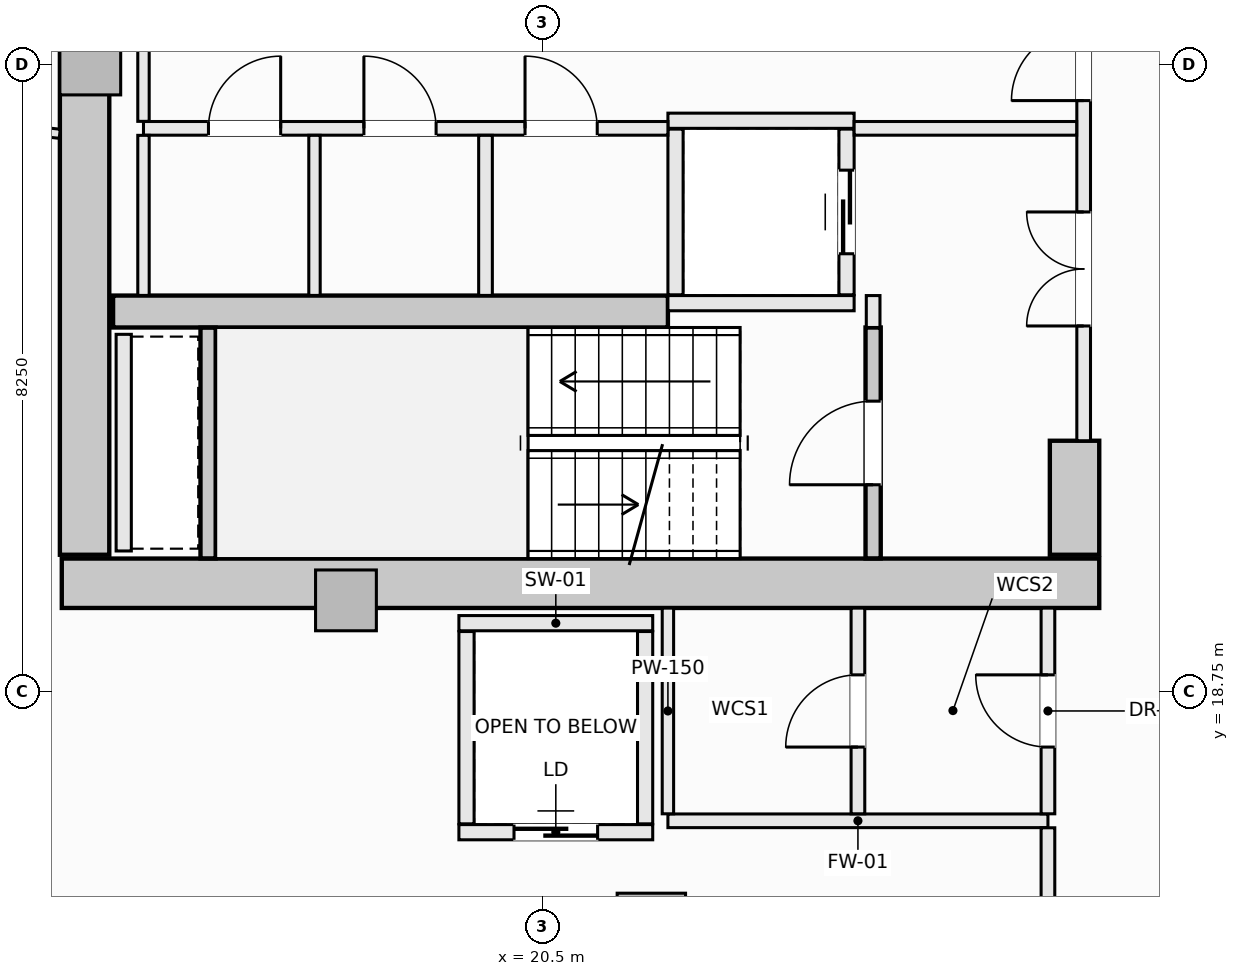
"""IFC4 building model, lengths in metres.
Left out: names, types, materials, properties, quantities, classifications, styles, units other than length and angle.
Written with IfcOpenShell. Run it as: python <this file> out.ifc"""

import sys

from ifc_helpers import new_model, si_unit, direction, frame, frame_2d, origin, origin_2d, place, context, subcontext, project, spatial, rectangle, extrude, element, fill, save


model = new_model("IFC4")
c1 = context("Model", 3, precision=1e-05, world=origin(), true_north=direction((0.0, 1.0)))
c2 = subcontext(c1, "Body", "Model", "MODEL_VIEW")
j1 = project(units=[si_unit("LENGTHUNIT", "METRE"), si_unit("PLANEANGLEUNIT", "RADIAN")], contexts=[c1])
p1 = place(None, origin())
s1 = spatial("IfcSite", under=j1, at=p1, CompositionType="ELEMENT")
p2 = place(p1, origin())
s2 = spatial("IfcBuilding", under=s1, at=p2, CompositionType="ELEMENT")
p3 = place(p2, frame((0.0, 0.0, 112.1)))
s3 = spatial("IfcBuildingStorey", under=s2, at=p3, CompositionType="ELEMENT", Elevation=112.1)
p4 = place(p3, frame((14.175, 20.175, -0.27), z_axis=(0.0, 0.0, 1.0), x_axis=(1.0, 0.0, 0.0)))
e1 = element("IfcWall", 1, at=p4, inside=s3, PredefinedType="SHEAR", context=c2, shape_type="SweptSolid", body=[
    extrude(rectangle(XDim=13.65, YDim=0.65, at=frame_2d((6.825, 0.0))), origin(), (0.0, 0.0, 1.0), 3.4),
])
p5 = place(p3, frame((14.475, 20.55, -0.27), z_axis=(0.0, 0.0, 1.0), x_axis=(0.0, 1.0, 0.0)))
e2 = element("IfcWall", 2, at=p5, inside=s3, PredefinedType="SHEAR", context=c2, shape_type="SweptSolid", body=[
    extrude(rectangle(XDim=12.9, YDim=0.65, at=frame_2d((6.45, 0.0))), origin(), (0.0, 0.0, 1.0), 3.4),
])
p6 = place(p3, frame((27.5, 20.55, -0.27), z_axis=(0.0, 0.0, 1.0), x_axis=(0.0, 1.0, 0.0)))
e3 = element("IfcWall", 3, at=p6, inside=s3, PredefinedType="SHEAR", context=c2, shape_type="SweptSolid", body=[
    extrude(rectangle(XDim=1.5, YDim=0.65, at=frame_2d((0.75, 0.0))), origin(), (0.0, 0.0, 1.0), 3.4),
])
p7 = place(p3, frame((14.85, 23.75, -0.27), z_axis=(0.0, 0.0, 1.0), x_axis=(1.0, 0.0, 0.0)))
e4 = element("IfcWall", 4, at=p7, inside=s3, PredefinedType="SHEAR", context=c2, shape_type="SweptSolid", body=[
    extrude(rectangle(XDim=7.3, YDim=0.42, at=frame_2d((3.65, 0.0))), origin(), (0.0, 0.0, 1.0), 3.4),
])
p8 = place(p3, frame((21.932, 15.648, -0.27), z_axis=(0.0, 0.0, 1.0), x_axis=(1.0, 0.0, 0.0)))
e5 = element("IfcColumn", 5, at=p8, inside=s3, PredefinedType="COLUMN", context=c2, shape_type="SweptSolid", body=[
    extrude(rectangle(XDim=0.9, YDim=0.9, at=origin_2d()), origin(), (0.0, 0.0, 1.0), 3.4),
])
for number, where, z_axis, x_axis in (
    (6, (14.55, 27.0, -0.27), (0.0, 0.0, 1.0), (1.0, 0.0, 0.0)),
    (7, (17.914, 19.95, -0.27), (0.0, 0.0, 1.0), (1.0, 0.0, 0.0)),
):
    element("IfcColumn", number, at=place(p3, frame(where, z_axis=z_axis, x_axis=x_axis)), inside=s3, PredefinedType="PILASTER", context=c2, shape_type="SweptSolid", body=[
        extrude(rectangle(XDim=0.8, YDim=0.8, at=origin_2d()), origin(), (0.0, 0.0, 1.0), 3.4),
    ])
p9 = place(p3, frame((9.178, 17.325, 0.0), z_axis=(0.0, 0.0, 1.0), x_axis=(0.901370184739, -0.433049408339, 0.0)))
e8 = element("IfcWall", 8, at=p9, inside=s3, PredefinedType="SOLIDWALL", context=c2, shape_type="SweptSolid", body=[
    extrude(rectangle(XDim=5.884, YDim=0.3, at=frame_2d((2.942, 0.0))), origin(), (0.0, 0.0, 1.0), 2.653),
])
p10 = place(p9, frame((1.892, 0.0, 0.74)))
e9 = element("IfcOpeningElement", 9, at=p10, cuts=e8, PredefinedType="OPENING", context=c2, shape_type="SweptSolid", body=[
    extrude(rectangle(XDim=2.1, YDim=1.7, at=frame_2d((1.05, 0.85))), frame((0.0, 0.16, 0.0), z_axis=(0.0, -1.0, 0.0), x_axis=(1.0, 0.0, 0.0)), (0.0, 0.0, 1.0), 0.32),
])
p11 = place(p3, frame((24.85, 20.502, -0.27), z_axis=(0.0, 0.0, 1.0), x_axis=(0.0, 1.0, 0.0)))
e10 = element("IfcWall", 10, at=p11, inside=s3, PredefinedType="SHEAR", context=c2, shape_type="SweptSolid", body=[
    extrude(rectangle(XDim=3.038, YDim=0.2, at=frame_2d((1.519, 0.0))), origin(), (0.0, 0.0, 1.0), 3.4),
])
p12 = place(p11, frame((0.969, 0.0, 0.27)))
e11 = element("IfcOpeningElement", 11, at=p12, cuts=e10, PredefinedType="OPENING", context=c2, shape_type="SweptSolid", body=[
    extrude(rectangle(XDim=1.1, YDim=2.15, at=frame_2d((0.55, 1.075))), frame((0.0, 0.11, 0.0), z_axis=(0.0, -1.0, 0.0), x_axis=(1.0, 0.0, 0.0)), (0.0, 0.0, 1.0), 0.22),
])
p13 = place(p3, frame((16.1, 20.502, -0.27), z_axis=(0.0, 0.0, 1.0), x_axis=(0.0, 1.0, 0.0)))
e12 = element("IfcWall", 12, at=p13, inside=s3, PredefinedType="SHEAR", context=c2, shape_type="SweptSolid", body=[
    extrude(rectangle(XDim=3.036, YDim=0.2, at=frame_2d((1.518, 0.0))), origin(), (0.0, 0.0, 1.0), 3.4),
])
for number, where, z_axis, x_axis in (
    (13, (22.15, 26.26, 0.0), (0.0, 0.0, 1.0), (1.0, 0.0, 0.0)),
    (14, (22.15, 23.86, 0.0), (0.0, 0.0, 1.0), (1.0, 0.0, 0.0)),
):
    element("IfcWall", number, at=place(p3, frame(where, z_axis=z_axis, x_axis=x_axis)), inside=s3, PredefinedType="SOLIDWALL", context=c2, shape_type="SweptSolid", body=[
        extrude(rectangle(XDim=2.45, YDim=0.2, at=frame_2d((1.225, 0.0))), origin(), (0.0, 0.0, 1.0), 3.13),
    ])
p14 = place(p3, frame((22.25, 23.97, 0.0), z_axis=(0.0, 0.0, 1.0), x_axis=(0.0, 1.0, 0.0)))
e15 = element("IfcWall", 15, at=p14, inside=s3, PredefinedType="SOLIDWALL", context=c2, shape_type="SweptSolid", body=[
    extrude(rectangle(XDim=2.18, YDim=0.2, at=frame_2d((1.09, 0.0))), origin(), (0.0, 0.0, 1.0), 3.13),
])
p15 = place(p3, frame((24.5, 23.97, 0.0), z_axis=(0.0, 0.0, 1.0), x_axis=(0.0, 1.0, 0.0)))
e16 = element("IfcWall", 16, at=p15, inside=s3, PredefinedType="SOLIDWALL", context=c2, shape_type="SweptSolid", body=[
    extrude(rectangle(XDim=2.18, YDim=0.2, at=frame_2d((1.09, 0.0))), origin(), (0.0, 0.0, 1.0), 3.13),
])
p16 = place(p15, frame((0.54, 0.0, 0.0)))
e17 = element("IfcOpeningElement", 17, at=p16, cuts=e16, PredefinedType="OPENING", context=c2, shape_type="SweptSolid", body=[
    extrude(rectangle(XDim=1.1, YDim=2.2, at=frame_2d((0.55, 1.1))), frame((0.0, 0.11, 0.0), z_axis=(0.0, -1.0, 0.0), x_axis=(1.0, 0.0, 0.0)), (0.0, 0.0, 1.0), 0.22),
])
p17 = place(p3, frame((19.4, 19.65, 0.0), z_axis=(0.0, 0.0, 1.0), x_axis=(1.0, 0.0, 0.0)))
e18 = element("IfcWall", 18, at=p17, inside=s3, PredefinedType="SOLIDWALL", context=c2, shape_type="SweptSolid", body=[
    extrude(rectangle(XDim=2.55, YDim=0.2, at=frame_2d((1.275, 0.0))), origin(), (0.0, 0.0, 1.0), 3.13),
])
p18 = place(p3, frame((19.4, 16.9, 0.0), z_axis=(0.0, 0.0, 1.0), x_axis=(1.0, 0.0, 0.0)))
e19 = element("IfcWall", 19, at=p18, inside=s3, PredefinedType="SOLIDWALL", context=c2, shape_type="SweptSolid", body=[
    extrude(rectangle(XDim=2.55, YDim=0.2, at=frame_2d((1.275, 0.0))), origin(), (0.0, 0.0, 1.0), 3.13),
])
p19 = place(p18, frame((0.725, 0.0, 0.0)))
e20 = element("IfcOpeningElement", 20, at=p19, cuts=e19, PredefinedType="OPENING", context=c2, shape_type="SweptSolid", body=[
    extrude(rectangle(XDim=1.1, YDim=2.2, at=frame_2d((0.55, 1.1))), frame((0.0, 0.11, 0.0), z_axis=(0.0, -1.0, 0.0), x_axis=(1.0, 0.0, 0.0)), (0.0, 0.0, 1.0), 0.22),
])
for number, where, z_axis, x_axis in (
    (21, (19.5, 17.01, 0.0), (0.0, 0.0, 1.0), (0.0, 1.0, 0.0)),
    (22, (21.85, 17.01, 0.0), (0.0, 0.0, 1.0), (0.0, 1.0, 0.0)),
):
    element("IfcWall", number, at=place(p3, frame(where, z_axis=z_axis, x_axis=x_axis)), inside=s3, PredefinedType="SOLIDWALL", context=c2, shape_type="SweptSolid", body=[
        extrude(rectangle(XDim=2.53, YDim=0.2, at=frame_2d((1.265, 0.0))), origin(), (0.0, 0.0, 1.0), 3.13),
    ])
p20 = place(p3, frame((14.99, 20.6, 0.0), z_axis=(0.0, 0.0, 1.0), x_axis=(0.0, 1.0, 0.0)))
e23 = element("IfcWall", 23, at=p20, inside=s3, PredefinedType="SOLIDWALL", context=c2, shape_type="SweptSolid", body=[
    extrude(rectangle(XDim=2.85, YDim=0.2, at=frame_2d((1.425, 0.0))), origin(), (0.0, 0.0, 1.0), 3.13),
])
p21 = place(p3, frame((24.85, 23.54, 0.0), z_axis=(0.0, 0.0, 1.0), x_axis=(0.0, 1.0, 0.0)))
e24 = element("IfcWall", 24, at=p21, inside=s3, PredefinedType="SOLIDWALL", context=c2, shape_type="SweptSolid", body=[
    extrude(rectangle(XDim=0.42, YDim=0.18, at=frame_2d((0.21, 0.0))), origin(), (0.0, 0.0, 1.0), 3.13),
])
p22 = place(p3, frame((27.62, 22.05, 0.0), z_axis=(0.0, 0.0, 1.0), x_axis=(0.0, 1.0, 0.0)))
e25 = element("IfcWall", 25, at=p22, inside=s3, PredefinedType="SOLIDWALL", context=c2, shape_type="SweptSolid", body=[
    extrude(rectangle(XDim=9.9, YDim=0.18, at=frame_2d((4.95, 0.0))), origin(), (0.0, 0.0, 1.0), 3.13),
])
p23 = place(p22, frame((4.475, 0.0, 0.0)))
e26 = element("IfcOpeningElement", 26, at=p23, cuts=e25, PredefinedType="OPENING", context=c2, shape_type="SweptSolid", body=[
    extrude(rectangle(XDim=0.95, YDim=2.1, at=frame_2d((0.475, 1.05))), frame((0.0, 0.1, 0.0), z_axis=(0.0, -1.0, 0.0), x_axis=(1.0, 0.0, 0.0)), (0.0, 0.0, 1.0), 0.2),
])
p24 = place(p22, frame((6.89, 0.0, 0.0)))
e27 = element("IfcOpeningElement", 27, at=p24, cuts=e25, PredefinedType="OPENING", context=c2, shape_type="SweptSolid", body=[
    extrude(rectangle(XDim=1.5, YDim=2.2, at=frame_2d((0.75, 1.1))), frame((0.0, 0.1, 0.0), z_axis=(0.0, -1.0, 0.0), x_axis=(1.0, 0.0, 0.0)), (0.0, 0.0, 1.0), 0.2),
])
p25 = place(p22, frame((1.51, 0.0, 0.0)))
e28 = element("IfcOpeningElement", 28, at=p25, cuts=e25, PredefinedType="OPENING", context=c2, shape_type="SweptSolid", body=[
    extrude(rectangle(XDim=1.5, YDim=2.2, at=frame_2d((0.75, 1.1))), frame((0.0, 0.1, 0.0), z_axis=(0.0, -1.0, 0.0), x_axis=(1.0, 0.0, 0.0)), (0.0, 0.0, 1.0), 0.2),
])
p26 = place(p3, frame((15.25, 26.16, 0.0), z_axis=(0.0, 0.0, 1.0), x_axis=(1.0, 0.0, 0.0)))
e29 = element("IfcWall", 29, at=p26, inside=s3, PredefinedType="SOLIDWALL", context=c2, shape_type="SweptSolid", body=[
    extrude(rectangle(XDim=6.9, YDim=0.18, at=frame_2d((3.45, 0.0))), origin(), (0.0, 0.0, 1.0), 3.13),
])
p27 = place(p26, frame((5.02, 0.0, 0.0)))
e30 = element("IfcOpeningElement", 30, at=p27, cuts=e29, PredefinedType="OPENING", context=c2, shape_type="SweptSolid", body=[
    extrude(rectangle(XDim=0.95, YDim=2.1, at=frame_2d((0.475, 1.05))), frame((0.0, 0.1, 0.0), z_axis=(0.0, -1.0, 0.0), x_axis=(1.0, 0.0, 0.0)), (0.0, 0.0, 1.0), 0.2),
])
p28 = place(p26, frame((0.855, 0.0, 0.0)))
e31 = element("IfcOpeningElement", 31, at=p28, cuts=e29, PredefinedType="OPENING", context=c2, shape_type="SweptSolid", body=[
    extrude(rectangle(XDim=0.95, YDim=2.1, at=frame_2d((0.475, 1.05))), frame((0.0, 0.1, 0.0), z_axis=(0.0, -1.0, 0.0), x_axis=(1.0, 0.0, 0.0)), (0.0, 0.0, 1.0), 0.2),
])
p29 = place(p26, frame((2.9, 0.0, 0.0)))
e32 = element("IfcOpeningElement", 32, at=p29, cuts=e29, PredefinedType="OPENING", context=c2, shape_type="SweptSolid", body=[
    extrude(rectangle(XDim=0.95, YDim=2.1, at=frame_2d((0.475, 1.05))), frame((0.0, 0.1, 0.0), z_axis=(0.0, -1.0, 0.0), x_axis=(1.0, 0.0, 0.0)), (0.0, 0.0, 1.0), 0.2),
])
p30 = place(p3, frame((24.6, 26.16, 0.0), z_axis=(0.0, 0.0, 1.0), x_axis=(1.0, 0.0, 0.0)))
e33 = element("IfcWall", 33, at=p30, inside=s3, PredefinedType="SOLIDWALL", context=c2, shape_type="SweptSolid", body=[
    extrude(rectangle(XDim=2.928, YDim=0.18, at=frame_2d((1.464, 0.0))), origin(), (0.0, 0.0, 1.0), 3.13),
])
p31 = place(p3, frame((15.25, 23.962, 0.0), z_axis=(0.0, 0.0, 1.0), x_axis=(0.0, 1.0, 0.0)))
e34 = element("IfcWall", 34, at=p31, inside=s3, PredefinedType="PARTITIONING", context=c2, shape_type="SweptSolid", body=[
    extrude(rectangle(XDim=2.106, YDim=0.15, at=frame_2d((1.053, 0.0))), origin(), (0.0, 0.0, 1.0), 3.13),
])
p32 = place(p3, frame((15.25, 26.252, 0.0), z_axis=(0.0, 0.0, 1.0), x_axis=(0.0, 1.0, 0.0)))
e35 = element("IfcWall", 35, at=p32, inside=s3, PredefinedType="PARTITIONING", context=c2, shape_type="SweptSolid", body=[
    extrude(rectangle(XDim=1.496, YDim=0.15, at=frame_2d((0.748, 0.0))), origin(), (0.0, 0.0, 1.0), 3.13),
])
p33 = place(p3, frame((19.75, 23.962, 0.0), z_axis=(0.0, 0.0, 1.0), x_axis=(0.0, 1.0, 0.0)))
e36 = element("IfcWall", 36, at=p33, inside=s3, PredefinedType="SOLIDWALL", context=c2, shape_type="SweptSolid", body=[
    extrude(rectangle(XDim=2.106, YDim=0.18, at=frame_2d((1.053, 0.0))), origin(), (0.0, 0.0, 1.0), 3.13),
])
p34 = place(p3, frame((17.5, 23.962, 0.0), z_axis=(0.0, 0.0, 1.0), x_axis=(0.0, 1.0, 0.0)))
e37 = element("IfcWall", 37, at=p34, inside=s3, PredefinedType="PARTITIONING", context=c2, shape_type="SweptSolid", body=[
    extrude(rectangle(XDim=2.106, YDim=0.15, at=frame_2d((1.053, 0.0))), origin(), (0.0, 0.0, 1.0), 3.13),
])
p35 = place(p3, frame((22.15, 17.05, 0.0), z_axis=(0.0, 0.0, 1.0), x_axis=(1.0, 0.0, 0.0)))
e38 = element("IfcWall", 38, at=p35, inside=s3, PredefinedType="SOLIDWALL", context=c2, shape_type="SweptSolid", body=[
    extrude(rectangle(XDim=5.0, YDim=0.18, at=frame_2d((2.5, 0.0))), origin(), (0.0, 0.0, 1.0), 3.13),
])
p36 = place(p3, frame((22.15, 17.142, 0.0), z_axis=(0.0, 0.0, 1.0), x_axis=(0.0, 1.0, 0.0)))
e39 = element("IfcWall", 39, at=p36, inside=s3, PredefinedType="PARTITIONING", context=c2, shape_type="SweptSolid", body=[
    extrude(rectangle(XDim=2.706, YDim=0.15, at=frame_2d((1.353, 0.0))), origin(), (0.0, 0.0, 1.0), 3.13),
])
p37 = place(p3, frame((24.65, 17.142, 0.0), z_axis=(0.0, 0.0, 1.0), x_axis=(0.0, 1.0, 0.0)))
e40 = element("IfcWall", 40, at=p37, inside=s3, PredefinedType="SOLIDWALL", context=c2, shape_type="SweptSolid", body=[
    extrude(rectangle(XDim=2.706, YDim=0.18, at=frame_2d((1.353, 0.0))), origin(), (0.0, 0.0, 1.0), 3.13),
])
p38 = place(p37, frame((0.878, 0.0, 0.0)))
e41 = element("IfcOpeningElement", 41, at=p38, cuts=e40, PredefinedType="OPENING", context=c2, shape_type="SweptSolid", body=[
    extrude(rectangle(XDim=0.95, YDim=2.1, at=frame_2d((0.475, 1.05))), frame((0.0, 0.1, 0.0), z_axis=(0.0, -1.0, 0.0), x_axis=(1.0, 0.0, 0.0)), (0.0, 0.0, 1.0), 0.2),
])
p39 = place(p3, frame((27.15, 11.75, 0.0), z_axis=(0.0, 0.0, 1.0), x_axis=(0.0, 1.0, 0.0)))
e42 = element("IfcWall", 42, at=p39, inside=s3, PredefinedType="SOLIDWALL", context=c2, shape_type="SweptSolid", body=[
    extrude(rectangle(XDim=5.208, YDim=0.18, at=frame_2d((2.604, 0.0))), origin(), (0.0, 0.0, 1.0), 3.13),
])
p40 = place(p39, frame((2.961, 0.0, 0.0)))
e43 = element("IfcOpeningElement", 43, at=p40, cuts=e42, PredefinedType="OPENING", context=c2, shape_type="SweptSolid", body=[
    extrude(rectangle(XDim=0.95, YDim=2.1, at=frame_2d((0.475, 1.05))), frame((0.0, 0.1, 0.0), z_axis=(0.0, -1.0, 0.0), x_axis=(1.0, 0.0, 0.0)), (0.0, 0.0, 1.0), 0.2),
])
p41 = place(p3, frame((27.15, 17.142, 0.0), z_axis=(0.0, 0.0, 1.0), x_axis=(0.0, 1.0, 0.0)))
e44 = element("IfcWall", 44, at=p41, inside=s3, PredefinedType="SOLIDWALL", context=c2, shape_type="SweptSolid", body=[
    extrude(rectangle(XDim=2.706, YDim=0.18, at=frame_2d((1.353, 0.0))), origin(), (0.0, 0.0, 1.0), 3.13),
])
p42 = place(p41, frame((0.878, 0.0, 0.0)))
e45 = element("IfcOpeningElement", 45, at=p42, cuts=e44, PredefinedType="OPENING", context=c2, shape_type="SweptSolid", body=[
    extrude(rectangle(XDim=0.95, YDim=2.1, at=frame_2d((0.475, 1.05))), frame((0.0, 0.1, 0.0), z_axis=(0.0, -1.0, 0.0), x_axis=(1.0, 0.0, 0.0)), (0.0, 0.0, 1.0), 0.2),
])
p43 = place(p3, frame((6.095, 26.981, 0.0), z_axis=(0.0, 0.0, 1.0), x_axis=(0.993917127708, -0.11013057363, 0.0)))
e46 = element("IfcWall", 46, at=p43, inside=s3, PredefinedType="PARTITIONING", context=c2, shape_type="SweptSolid", body=[
    extrude(rectangle(XDim=8.103, YDim=0.12, at=frame_2d((4.051, 0.0))), origin(), (0.0, 0.0, 1.0), 2.505),
])
p44 = place(p12, origin())
e47 = element("IfcDoor", 47, at=p44, inside=s3, OperationType="SINGLE_SWING_LEFT", PredefinedType="DOOR", context=c2, shape_type="SweptSolid", body=[
    extrude(rectangle(XDim=1.1, YDim=2.15, at=frame_2d((0.55, 1.075))), frame((0.0, 0.025, 0.0), z_axis=(0.0, -1.0, 0.0), x_axis=(1.0, 0.0, 0.0)), (0.0, 0.0, 1.0), 0.05),
])
fill(e11, e47)
p45 = place(p16, origin())
e48 = element("IfcDoor", 48, at=p45, inside=s3, OperationType="SLIDING_TO_LEFT", PredefinedType="DOOR", context=c2, shape_type="SweptSolid", body=[
    extrude(rectangle(XDim=1.1, YDim=2.2, at=frame_2d((0.55, 1.1))), frame((0.0, 0.025, 0.0), z_axis=(0.0, -1.0, 0.0), x_axis=(1.0, 0.0, 0.0)), (0.0, 0.0, 1.0), 0.05),
])
fill(e17, e48)
p46 = place(p19, origin())
e49 = element("IfcDoor", 49, at=p46, inside=s3, OperationType="SLIDING_TO_LEFT", PredefinedType="DOOR", context=c2, shape_type="SweptSolid", body=[
    extrude(rectangle(XDim=1.1, YDim=2.2, at=frame_2d((0.55, 1.1))), frame((0.0, 0.025, 0.0), z_axis=(0.0, -1.0, 0.0), x_axis=(1.0, 0.0, 0.0)), (0.0, 0.0, 1.0), 0.05),
])
fill(e20, e49)
p47 = place(p23, origin())
e50 = element("IfcDoor", 50, at=p47, inside=s3, OperationType="SINGLE_SWING_LEFT", PredefinedType="DOOR", context=c2, shape_type="SweptSolid", body=[
    extrude(rectangle(XDim=0.95, YDim=2.1, at=frame_2d((0.475, 1.05))), frame((0.0, 0.025, 0.0), z_axis=(0.0, -1.0, 0.0), x_axis=(1.0, 0.0, 0.0)), (0.0, 0.0, 1.0), 0.05),
])
fill(e26, e50)
p48 = place(p25, origin())
e51 = element("IfcDoor", 51, at=p48, inside=s3, OperationType="DOUBLE_DOOR_SINGLE_SWING", PredefinedType="DOOR", context=c2, shape_type="SweptSolid", body=[
    extrude(rectangle(XDim=1.5, YDim=2.2, at=frame_2d((0.75, 1.1))), frame((0.0, 0.025, 0.0), z_axis=(0.0, -1.0, 0.0), x_axis=(1.0, 0.0, 0.0)), (0.0, 0.0, 1.0), 0.05),
])
fill(e28, e51)
p49 = place(p27, origin())
e52 = element("IfcDoor", 52, at=p49, inside=s3, OperationType="SINGLE_SWING_LEFT", PredefinedType="DOOR", context=c2, shape_type="SweptSolid", body=[
    extrude(rectangle(XDim=0.95, YDim=2.1, at=frame_2d((0.475, 1.05))), frame((0.0, 0.025, 0.0), z_axis=(0.0, -1.0, 0.0), x_axis=(1.0, 0.0, 0.0)), (0.0, 0.0, 1.0), 0.05),
])
fill(e30, e52)
p50 = place(p28, origin())
e53 = element("IfcDoor", 53, at=p50, inside=s3, OperationType="SINGLE_SWING_RIGHT", PredefinedType="DOOR", context=c2, shape_type="SweptSolid", body=[
    extrude(rectangle(XDim=0.95, YDim=2.1, at=frame_2d((0.475, 1.05))), frame((0.0, 0.025, 0.0), z_axis=(0.0, -1.0, 0.0), x_axis=(1.0, 0.0, 0.0)), (0.0, 0.0, 1.0), 0.05),
])
fill(e31, e53)
p51 = place(p29, origin())
e54 = element("IfcDoor", 54, at=p51, inside=s3, OperationType="SINGLE_SWING_LEFT", PredefinedType="DOOR", context=c2, shape_type="SweptSolid", body=[
    extrude(rectangle(XDim=0.95, YDim=2.1, at=frame_2d((0.475, 1.05))), frame((0.0, 0.025, 0.0), z_axis=(0.0, -1.0, 0.0), x_axis=(1.0, 0.0, 0.0)), (0.0, 0.0, 1.0), 0.05),
])
fill(e32, e54)
p52 = place(p42, origin())
e55 = element("IfcDoor", 55, at=p52, inside=s3, OperationType="SINGLE_SWING_RIGHT", PredefinedType="DOOR", context=c2, shape_type="SweptSolid", body=[
    extrude(rectangle(XDim=0.95, YDim=2.1, at=frame_2d((0.475, 1.05))), frame((0.0, 0.025, 0.0), z_axis=(0.0, -1.0, 0.0), x_axis=(1.0, 0.0, 0.0)), (0.0, 0.0, 1.0), 0.05),
])
fill(e45, e55)
p53 = place(p38, origin())
e56 = element("IfcDoor", 56, at=p53, inside=s3, OperationType="SINGLE_SWING_LEFT", PredefinedType="DOOR", context=c2, shape_type="SweptSolid", body=[
    extrude(rectangle(XDim=0.95, YDim=2.1, at=frame_2d((0.475, 1.05))), frame((0.0, 0.025, 0.0), z_axis=(0.0, -1.0, 0.0), x_axis=(1.0, 0.0, 0.0)), (0.0, 0.0, 1.0), 0.05),
])
fill(e41, e56)
save(model, sys.argv[1])
